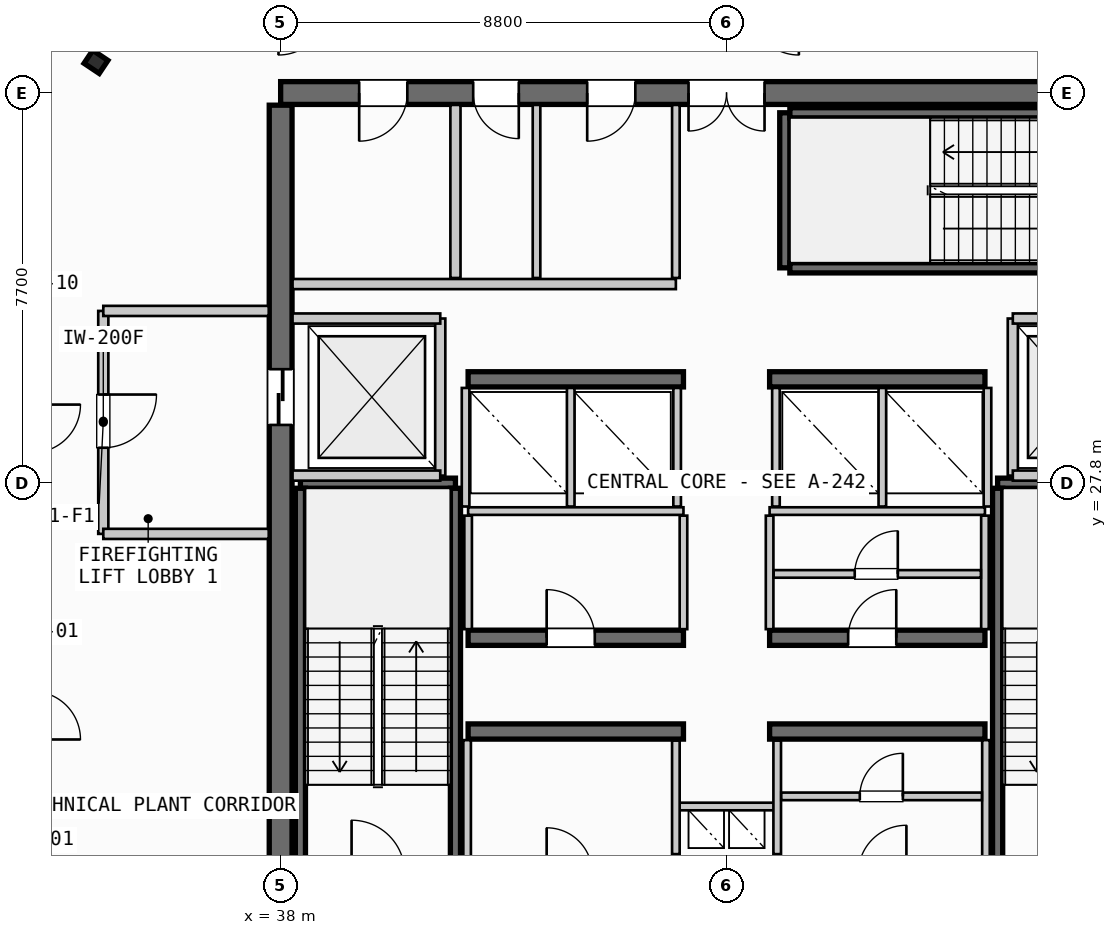
"""IFC4 building model, lengths in metres.
Left out: names, types, materials, properties, quantities, classifications, styles, units other than length and angle.
Written with IfcOpenShell. Run it as: python <this file> out.ifc"""

import sys

from ifc_helpers import new_model, si_unit, direction, frame, frame_2d, origin, origin_2d, place, context, subcontext, project, spatial, rectangle, i_section, extrude, source, transform, mapped, element, fill, save


model = new_model("IFC4")
c1 = context("Model", 3, precision=1e-05, world=origin(), true_north=direction((0.0, 1.0)))
c2 = subcontext(c1, "Body", "Model", "MODEL_VIEW")
j1 = project(units=[si_unit("LENGTHUNIT", "METRE"), si_unit("PLANEANGLEUNIT", "RADIAN")], contexts=[c1])
p1 = place(None, origin())
s1 = spatial("IfcSite", under=j1, at=p1, CompositionType="ELEMENT")
p2 = place(p1, origin())
s2 = spatial("IfcBuilding", under=s1, at=p2, CompositionType="ELEMENT")
p3 = place(p2, frame((0.0, 0.0, 304.3)))
s3 = spatial("IfcBuildingStorey", under=s2, at=p3, CompositionType="ELEMENT", Elevation=304.3)
p4 = place(p3, frame((55.6, 35.5, 0.0), z_axis=(0.0, 0.0, 1.0), x_axis=(-1.0, 0.0, 0.0)))
e1 = element("IfcWall", 1, at=p4, inside=s3, PredefinedType="SHEAR", context=c2, shape_type="SweptSolid", body=[
    extrude(rectangle(XDim=17.6, YDim=0.45, at=frame_2d((8.8, 0.0))), origin(), (0.0, 0.0, 1.0), 3.735),
])
p5 = place(p4, frame((8.05, 0.0, 0.0)))
e2 = element("IfcOpeningElement", 2, at=p5, cuts=e1, PredefinedType="OPENING", context=c2, shape_type="SweptSolid", body=[
    extrude(rectangle(XDim=1.5, YDim=2.2, at=frame_2d((0.75, 1.1))), frame((0.0, 0.235, 0.0), z_axis=(0.0, -1.0, 0.0), x_axis=(1.0, 0.0, 0.0)), (0.0, 0.0, 1.0), 0.47),
])
p6 = place(p4, frame((15.1, 0.0, 0.0)))
e3 = element("IfcOpeningElement", 3, at=p6, cuts=e1, PredefinedType="OPENING", context=c2, shape_type="SweptSolid", body=[
    extrude(rectangle(XDim=0.95, YDim=2.15, at=frame_2d((0.475, 1.075))), frame((0.0, 0.235, 0.0), z_axis=(0.0, -1.0, 0.0), x_axis=(1.0, 0.0, 0.0)), (0.0, 0.0, 1.0), 0.47),
])
p7 = place(p4, frame((12.9, 0.0, 0.0)))
e4 = element("IfcOpeningElement", 4, at=p7, cuts=e1, PredefinedType="OPENING", context=c2, shape_type="SweptSolid", body=[
    extrude(rectangle(XDim=0.9, YDim=2.15, at=frame_2d((0.45, 1.075))), frame((0.0, 0.235, 0.0), z_axis=(0.0, -1.0, 0.0), x_axis=(1.0, 0.0, 0.0)), (0.0, 0.0, 1.0), 0.47),
])
p8 = place(p4, frame((10.6, 0.0, 0.0)))
e5 = element("IfcOpeningElement", 5, at=p8, cuts=e1, PredefinedType="OPENING", context=c2, shape_type="SweptSolid", body=[
    extrude(rectangle(XDim=0.95, YDim=2.15, at=frame_2d((0.475, 1.075))), frame((0.0, 0.235, 0.0), z_axis=(0.0, -1.0, 0.0), x_axis=(1.0, 0.0, 0.0)), (0.0, 0.0, 1.0), 0.47),
])
p9 = place(p3, frame((38.0, 35.26, 0.0), z_axis=(0.0, 0.0, 1.0), x_axis=(0.0, -1.0, 0.0)))
e6 = element("IfcWall", 6, at=p9, inside=s3, PredefinedType="SHEAR", context=c2, shape_type="SweptSolid", body=[
    extrude(rectangle(XDim=14.92, YDim=0.45, at=frame_2d((7.46, 0.0))), origin(), (0.0, 0.0, 1.0), 3.735),
])
p10 = place(p9, frame((5.21, 0.0, 0.0)))
e7 = element("IfcOpeningElement", 7, at=p10, cuts=e6, PredefinedType="OPENING", context=c2, shape_type="SweptSolid", body=[
    extrude(rectangle(XDim=1.1, YDim=2.2, at=frame_2d((0.55, 1.1))), frame((0.0, 0.235, 0.0), z_axis=(0.0, -1.0, 0.0), x_axis=(1.0, 0.0, 0.0)), (0.0, 0.0, 1.0), 0.47),
])
for number, where, z_axis, x_axis in (
    (8, (41.7, 22.9, 0.0), (0.0, 0.0, 1.0), (1.0, 0.0, 0.0)),
    (9, (47.65, 22.9, 0.0), (0.0, 0.0, 1.0), (1.0, 0.0, 0.0)),
):
    element("IfcWall", number, at=place(p3, frame(where, z_axis=z_axis, x_axis=x_axis)), inside=s3, PredefinedType="SHEAR", context=c2, shape_type="SweptSolid", body=[
        extrude(rectangle(XDim=4.25, YDim=0.3, at=frame_2d((2.125, 0.0))), origin(), (0.0, 0.0, 1.0), 3.735),
    ])
p11 = place(p3, frame((41.7, 24.75, 0.0), z_axis=(0.0, 0.0, 1.0), x_axis=(1.0, 0.0, 0.0)))
e10 = element("IfcWall", 10, at=p11, inside=s3, PredefinedType="SHEAR", context=c2, shape_type="SweptSolid", body=[
    extrude(rectangle(XDim=4.25, YDim=0.3, at=frame_2d((2.125, 0.0))), origin(), (0.0, 0.0, 1.0), 3.735),
])
p12 = place(p11, frame((1.55, 0.0, 0.0)))
e11 = element("IfcOpeningElement", 11, at=p12, cuts=e10, PredefinedType="OPENING", context=c2, shape_type="SweptSolid", body=[
    extrude(rectangle(XDim=0.95, YDim=2.15, at=frame_2d((0.475, 1.075))), frame((0.0, 0.16, 0.0), z_axis=(0.0, -1.0, 0.0), x_axis=(1.0, 0.0, 0.0)), (0.0, 0.0, 1.0), 0.32),
])
p13 = place(p3, frame((47.65, 24.75, 0.0), z_axis=(0.0, 0.0, 1.0), x_axis=(1.0, 0.0, 0.0)))
e12 = element("IfcWall", 12, at=p13, inside=s3, PredefinedType="SHEAR", context=c2, shape_type="SweptSolid", body=[
    extrude(rectangle(XDim=4.25, YDim=0.3, at=frame_2d((2.125, 0.0))), origin(), (0.0, 0.0, 1.0), 3.735),
])
p14 = place(p13, frame((1.55, 0.0, 0.0)))
e13 = element("IfcOpeningElement", 13, at=p14, cuts=e12, PredefinedType="OPENING", context=c2, shape_type="SweptSolid", body=[
    extrude(rectangle(XDim=0.95, YDim=2.15, at=frame_2d((0.475, 1.075))), frame((0.0, 0.16, 0.0), z_axis=(0.0, -1.0, 0.0), x_axis=(1.0, 0.0, 0.0)), (0.0, 0.0, 1.0), 0.32),
])
for number, where, z_axis, x_axis in (
    (14, (41.7, 29.85, 0.0), (0.0, 0.0, 1.0), (1.0, 0.0, 0.0)),
    (15, (47.65, 29.85, 0.0), (0.0, 0.0, 1.0), (1.0, 0.0, 0.0)),
):
    element("IfcWall", number, at=place(p3, frame(where, z_axis=z_axis, x_axis=x_axis)), inside=s3, PredefinedType="SHEAR", context=c2, shape_type="SweptSolid", body=[
        extrude(rectangle(XDim=4.25, YDim=0.3, at=frame_2d((2.125, 0.0))), origin(), (0.0, 0.0, 1.0), 3.735),
    ])
m1 = source(origin(), c2, "Body", "SweptSolid", [
    extrude(i_section(OverallWidth=0.309, OverallDepth=0.359, WebThickness=0.016, FlangeThickness=0.026, FilletRadius=0.027, at=origin_2d()), origin(), (0.0, 0.0, 1.0), 3.735),
])
p15 = place(p3, frame((34.356, 36.115, 0.0), z_axis=(0.0, 0.0, 1.0), x_axis=(-0.831469612303, 0.55557023302, 0.0)))
e16 = element("IfcColumn", 16, at=p15, inside=s3, PredefinedType="COLUMN", context=c2, shape_type="MappedRepresentation", body=[
    mapped(m1, transform((0.0, 0.0, 0.0), scale=1.0)),
])
p16 = place(p3, frame((38.39, 27.8, 0.0), z_axis=(0.0, 0.0, 1.0), x_axis=(1.0, 0.0, 0.0)))
e17 = element("IfcWall", 17, at=p16, inside=s3, PredefinedType="SHEAR", context=c2, shape_type="SweptSolid", body=[
    extrude(rectangle(XDim=3.06, YDim=0.2, at=frame_2d((1.53, 0.0))), origin(), (0.0, 0.0, 1.0), 3.735),
])
for number, where, z_axis, x_axis in (
    (18, (41.45, 27.7, 0.0), (0.0, 0.0, 1.0), (0.0, -1.0, 0.0)),
    (19, (38.39, 20.35, 0.0), (0.0, 0.0, 1.0), (0.0, 1.0, 0.0)),
):
    element("IfcWall", number, at=place(p3, frame(where, z_axis=z_axis, x_axis=x_axis)), inside=s3, PredefinedType="SHEAR", context=c2, shape_type="SweptSolid", body=[
        extrude(rectangle(XDim=7.35, YDim=0.2, at=frame_2d((3.675, 0.0))), origin(), (0.0, 0.0, 1.0), 3.735),
    ])
p17 = place(p3, frame((52.15, 27.8, 0.0), z_axis=(0.0, 0.0, 1.0), x_axis=(1.0, 0.0, 0.0)))
e20 = element("IfcWall", 20, at=p17, inside=s3, PredefinedType="SHEAR", context=c2, shape_type="SweptSolid", body=[
    extrude(rectangle(XDim=3.06, YDim=0.2, at=frame_2d((1.53, 0.0))), origin(), (0.0, 0.0, 1.0), 3.735),
])
p18 = place(p3, frame((52.15, 20.35, 0.0), z_axis=(0.0, 0.0, 1.0), x_axis=(0.0, 1.0, 0.0)))
e21 = element("IfcWall", 21, at=p18, inside=s3, PredefinedType="SHEAR", context=c2, shape_type="SweptSolid", body=[
    extrude(rectangle(XDim=7.35, YDim=0.2, at=frame_2d((3.675, 0.0))), origin(), (0.0, 0.0, 1.0), 3.735),
])
p19 = place(p3, frame((47.95, 32.05, 0.0), z_axis=(0.0, 0.0, 1.0), x_axis=(0.0, 1.0, 0.0)))
e22 = element("IfcWall", 22, at=p19, inside=s3, PredefinedType="SHEAR", context=c2, shape_type="SweptSolid", body=[
    extrude(rectangle(XDim=3.06, YDim=0.2, at=frame_2d((1.53, 0.0))), origin(), (0.0, 0.0, 1.0), 3.735),
])
for number, where, z_axis, x_axis in (
    (23, (48.05, 35.11, 0.0), (0.0, 0.0, 1.0), (1.0, 0.0, 0.0)),
    (24, (55.4, 32.05, 0.0), (0.0, 0.0, 1.0), (-1.0, 0.0, 0.0)),
):
    element("IfcWall", number, at=place(p3, frame(where, z_axis=z_axis, x_axis=x_axis)), inside=s3, PredefinedType="SHEAR", context=c2, shape_type="SweptSolid", body=[
        extrude(rectangle(XDim=7.35, YDim=0.2, at=frame_2d((3.675, 0.0))), origin(), (0.0, 0.0, 1.0), 3.735),
    ])
p20 = place(p3, frame((45.8, 21.42, 0.0), z_axis=(0.0, 0.0, 1.0), x_axis=(1.0, 0.0, 0.0)))
e25 = element("IfcWall", 25, at=p20, inside=s3, PredefinedType="PARTITIONING", context=c2, shape_type="SweptSolid", body=[
    extrude(rectangle(XDim=2.0, YDim=0.15, at=frame_2d((1.0, 0.0))), origin(), (0.0, 0.0, 1.0), 3.26),
])
for number, where, z_axis, x_axis in (
    (26, (45.8, 20.48, 0.0), (0.0, 0.0, 1.0), (0.0, 1.0, 0.0)),
    (27, (47.8, 20.48, 0.0), (0.0, 0.0, 1.0), (0.0, 1.0, 0.0)),
):
    element("IfcWall", number, at=place(p3, frame(where, z_axis=z_axis, x_axis=x_axis)), inside=s3, PredefinedType="PARTITIONING", context=c2, shape_type="SweptSolid", body=[
        extrude(rectangle(XDim=2.24, YDim=0.15, at=frame_2d((1.12, 0.0))), origin(), (0.0, 0.0, 1.0), 3.26),
    ])
p21 = place(p3, frame((41.15, 27.95, 0.0), z_axis=(0.0, 0.0, 1.0), x_axis=(0.0, 1.0, 0.0)))
e28 = element("IfcWall", 28, at=p21, inside=s3, PredefinedType="PARTITIONING", context=c2, shape_type="SweptSolid", body=[
    extrude(rectangle(XDim=3.1, YDim=0.2, at=frame_2d((1.55, 0.0))), origin(), (0.0, 0.0, 1.0), 3.26),
])
for number, where, z_axis, x_axis in (
    (29, (38.235, 27.95, 0.0), (0.0, 0.0, 1.0), (1.0, 0.0, 0.0)),
    (30, (38.235, 31.05, 0.0), (0.0, 0.0, 1.0), (1.0, 0.0, 0.0)),
):
    element("IfcWall", number, at=place(p3, frame(where, z_axis=z_axis, x_axis=x_axis)), inside=s3, PredefinedType="PARTITIONING", context=c2, shape_type="SweptSolid", body=[
        extrude(rectangle(XDim=2.915, YDim=0.2, at=frame_2d((1.458, 0.0))), origin(), (0.0, 0.0, 1.0), 3.26),
    ])
p22 = place(p3, frame((34.5, 31.2, 0.0), z_axis=(0.0, 0.0, 1.0), x_axis=(0.0, -1.0, 0.0)))
e31 = element("IfcWall", 31, at=p22, inside=s3, PredefinedType="PARTITIONING", context=c2, shape_type="SweptSolid", body=[
    extrude(rectangle(XDim=4.4, YDim=0.2, at=frame_2d((2.2, 0.0))), origin(), (0.0, 0.0, 1.0), 3.26),
])
p23 = place(p22, frame((1.65, 0.0, 0.0)))
e32 = element("IfcOpeningElement", 32, at=p23, cuts=e31, PredefinedType="OPENING", context=c2, shape_type="SweptSolid", body=[
    extrude(rectangle(XDim=1.05, YDim=2.15, at=frame_2d((0.525, 1.075))), frame((0.0, 0.11, 0.0), z_axis=(0.0, -1.0, 0.0), x_axis=(1.0, 0.0, 0.0)), (0.0, 0.0, 1.0), 0.22),
])
for number, where, z_axis, x_axis in (
    (33, (34.5, 26.8, 0.0), (0.0, 0.0, 1.0), (1.0, 0.0, 0.0)),
    (34, (34.5, 31.2, 0.0), (0.0, 0.0, 1.0), (1.0, 0.0, 0.0)),
):
    element("IfcWall", number, at=place(p3, frame(where, z_axis=z_axis, x_axis=x_axis)), inside=s3, PredefinedType="PARTITIONING", context=c2, shape_type="SweptSolid", body=[
        extrude(rectangle(XDim=3.265, YDim=0.2, at=frame_2d((1.632, 0.0))), origin(), (0.0, 0.0, 1.0), 3.26),
    ])
p24 = place(p3, frame((52.45, 27.95, 0.0), z_axis=(0.0, 0.0, 1.0), x_axis=(0.0, 1.0, 0.0)))
e35 = element("IfcWall", 35, at=p24, inside=s3, PredefinedType="PARTITIONING", context=c2, shape_type="SweptSolid", body=[
    extrude(rectangle(XDim=3.1, YDim=0.2, at=frame_2d((1.55, 0.0))), origin(), (0.0, 0.0, 1.0), 3.26),
])
for number, where, z_axis, x_axis in (
    (36, (52.45, 27.95, 0.0), (0.0, 0.0, 1.0), (1.0, 0.0, 0.0)),
    (37, (52.45, 31.05, 0.0), (0.0, 0.0, 1.0), (1.0, 0.0, 0.0)),
):
    element("IfcWall", number, at=place(p3, frame(where, z_axis=z_axis, x_axis=x_axis)), inside=s3, PredefinedType="PARTITIONING", context=c2, shape_type="SweptSolid", body=[
        extrude(rectangle(XDim=2.915, YDim=0.2, at=frame_2d((1.458, 0.0))), origin(), (0.0, 0.0, 1.0), 3.26),
    ])
for number, where, z_axis, x_axis in (
    (38, (41.68, 20.335, 0.0), (0.0, 0.0, 1.0), (0.0, 1.0, 0.0)),
    (39, (51.92, 20.335, 0.0), (0.0, 0.0, 1.0), (0.0, 1.0, 0.0)),
):
    element("IfcWall", number, at=place(p3, frame(where, z_axis=z_axis, x_axis=x_axis)), inside=s3, PredefinedType="PARTITIONING", context=c2, shape_type="SweptSolid", body=[
        extrude(rectangle(XDim=2.395, YDim=0.15, at=frame_2d((1.198, 0.0))), origin(), (0.0, 0.0, 1.0), 3.26),
    ])
p25 = place(p3, frame((47.88, 21.62, 0.0), z_axis=(0.0, 0.0, 1.0), x_axis=(1.0, 0.0, 0.0)))
e40 = element("IfcWall", 40, at=p25, inside=s3, PredefinedType="PARTITIONING", context=c2, shape_type="SweptSolid", body=[
    extrude(rectangle(XDim=3.96, YDim=0.15, at=frame_2d((1.98, 0.0))), origin(), (0.0, 0.0, 1.0), 3.26),
])
p26 = place(p25, frame((1.55, 0.0, 0.0)))
e41 = element("IfcOpeningElement", 41, at=p26, cuts=e40, PredefinedType="OPENING", context=c2, shape_type="SweptSolid", body=[
    extrude(rectangle(XDim=0.85, YDim=2.15, at=frame_2d((0.425, 1.075))), frame((0.0, 0.085, 0.0), z_axis=(0.0, -1.0, 0.0), x_axis=(1.0, 0.0, 0.0)), (0.0, 0.0, 1.0), 0.17),
])
for number, where, z_axis, x_axis in (
    (42, (41.7, 27.25, 0.0), (0.0, 0.0, 1.0), (1.0, 0.0, 0.0)),
    (43, (47.65, 27.25, 0.0), (0.0, 0.0, 1.0), (1.0, 0.0, 0.0)),
):
    element("IfcWall", number, at=place(p3, frame(where, z_axis=z_axis, x_axis=x_axis)), inside=s3, PredefinedType="PARTITIONING", context=c2, shape_type="SweptSolid", body=[
        extrude(rectangle(XDim=4.25, YDim=0.15, at=frame_2d((2.125, 0.0))), origin(), (0.0, 0.0, 1.0), 3.26),
    ])
for number, where, z_axis, x_axis in (
    (44, (41.7, 24.92, 0.0), (0.0, 0.0, 1.0), (0.0, 1.0, 0.0)),
    (45, (45.95, 24.92, 0.0), (0.0, 0.0, 1.0), (0.0, 1.0, 0.0)),
    (46, (47.65, 24.92, 0.0), (0.0, 0.0, 1.0), (0.0, 1.0, 0.0)),
    (47, (51.9, 24.92, 0.0), (0.0, 0.0, 1.0), (0.0, 1.0, 0.0)),
):
    element("IfcWall", number, at=place(p3, frame(where, z_axis=z_axis, x_axis=x_axis)), inside=s3, PredefinedType="PARTITIONING", context=c2, shape_type="SweptSolid", body=[
        extrude(rectangle(XDim=2.24, YDim=0.15, at=frame_2d((1.12, 0.0))), origin(), (0.0, 0.0, 1.0), 3.26),
    ])
p27 = place(p3, frame((47.73, 26.01, 0.0), z_axis=(0.0, 0.0, 1.0), x_axis=(1.0, 0.0, 0.0)))
e48 = element("IfcWall", 48, at=p27, inside=s3, PredefinedType="PARTITIONING", context=c2, shape_type="SweptSolid", body=[
    extrude(rectangle(XDim=4.09, YDim=0.15, at=frame_2d((2.045, 0.0))), origin(), (0.0, 0.0, 1.0), 3.26),
])
p28 = place(p27, frame((1.6, 0.0, 0.0)))
e49 = element("IfcOpeningElement", 49, at=p28, cuts=e48, PredefinedType="OPENING", context=c2, shape_type="SweptSolid", body=[
    extrude(rectangle(XDim=0.85, YDim=2.15, at=frame_2d((0.425, 1.075))), frame((0.0, 0.085, 0.0), z_axis=(0.0, -1.0, 0.0), x_axis=(1.0, 0.0, 0.0)), (0.0, 0.0, 1.0), 0.17),
])
for number, where, z_axis, x_axis in (
    (50, (41.65, 27.34, 0.0), (0.0, 0.0, 1.0), (0.0, 1.0, 0.0)),
    (51, (43.725, 27.34, 0.0), (0.0, 0.0, 1.0), (0.0, 1.0, 0.0)),
    (52, (45.825, 27.34, 0.0), (0.0, 0.0, 1.0), (0.0, 1.0, 0.0)),
    (53, (47.775, 27.34, 0.0), (0.0, 0.0, 1.0), (0.0, 1.0, 0.0)),
    (54, (49.875, 27.34, 0.0), (0.0, 0.0, 1.0), (0.0, 1.0, 0.0)),
    (55, (51.95, 27.34, 0.0), (0.0, 0.0, 1.0), (0.0, 1.0, 0.0)),
):
    element("IfcWall", number, at=place(p3, frame(where, z_axis=z_axis, x_axis=x_axis)), inside=s3, PredefinedType="PARTITIONING", context=c2, shape_type="SweptSolid", body=[
        extrude(rectangle(XDim=2.34, YDim=0.15, at=frame_2d((1.17, 0.0))), origin(), (0.0, 0.0, 1.0), 3.26),
    ])
p29 = place(p3, frame((41.45, 31.85, 0.0), z_axis=(0.0, 0.0, 1.0), x_axis=(0.0, 1.0, 0.0)))
e56 = element("IfcWall", 56, at=p29, inside=s3, PredefinedType="PARTITIONING", context=c2, shape_type="SweptSolid", body=[
    extrude(rectangle(XDim=3.415, YDim=0.2, at=frame_2d((1.708, 0.0))), origin(), (0.0, 0.0, 1.0), 3.26),
])
p30 = place(p3, frame((38.235, 31.73, 0.0), z_axis=(0.0, 0.0, 1.0), x_axis=(1.0, 0.0, 0.0)))
e57 = element("IfcWall", 57, at=p30, inside=s3, PredefinedType="PARTITIONING", context=c2, shape_type="SweptSolid", body=[
    extrude(rectangle(XDim=7.565, YDim=0.2, at=frame_2d((3.782, 0.0))), origin(), (0.0, 0.0, 1.0), 3.26),
])
p31 = place(p3, frame((45.8, 31.85, 0.0), z_axis=(0.0, 0.0, 1.0), x_axis=(0.0, 1.0, 0.0)))
e58 = element("IfcWall", 58, at=p31, inside=s3, PredefinedType="PARTITIONING", context=c2, shape_type="SweptSolid", body=[
    extrude(rectangle(XDim=3.415, YDim=0.15, at=frame_2d((1.708, 0.0))), origin(), (0.0, 0.0, 1.0), 3.26),
])
p32 = place(p3, frame((43.05, 31.85, 0.0), z_axis=(0.0, 0.0, 1.0), x_axis=(0.0, 1.0, 0.0)))
e59 = element("IfcWall", 59, at=p32, inside=s3, PredefinedType="PLUMBINGWALL", context=c2, shape_type="SweptSolid", body=[
    extrude(rectangle(XDim=3.415, YDim=0.15, at=frame_2d((1.708, 0.0))), origin(), (0.0, 0.0, 1.0), 3.26),
])
m2 = source(origin(), c2, "Body", "SweptSolid", [
    extrude(rectangle(XDim=1.5, YDim=2.2, at=frame_2d((0.75, 1.1))), frame((0.0, 0.025, 0.0), z_axis=(0.0, -1.0, 0.0), x_axis=(1.0, 0.0, 0.0)), (0.0, 0.0, 1.0), 0.05),
])
p33 = place(p5, origin())
e60 = element("IfcDoor", 60, at=p33, inside=s3, OperationType="DOUBLE_DOOR_SINGLE_SWING", PredefinedType="DOOR", context=c2, shape_type="MappedRepresentation", body=[
    mapped(m2, transform((0.0, 0.0, 0.0), scale=1.0)),
])
fill(e2, e60)
m3 = source(origin(), c2, "Body", "SweptSolid", [
    extrude(rectangle(XDim=1.1, YDim=2.2, at=frame_2d((0.55, 1.1))), frame((0.0, 0.025, 0.0), z_axis=(0.0, -1.0, 0.0), x_axis=(1.0, 0.0, 0.0)), (0.0, 0.0, 1.0), 0.05),
])
p34 = place(p10, origin())
e61 = element("IfcDoor", 61, at=p34, inside=s3, OperationType="SLIDING_TO_LEFT", PredefinedType="DOOR", context=c2, shape_type="MappedRepresentation", body=[
    mapped(m3, transform((0.0, 0.0, 0.0), scale=1.0)),
])
fill(e7, e61)
m4 = source(origin(), c2, "Body", "SweptSolid", [
    extrude(rectangle(XDim=0.95, YDim=2.15, at=frame_2d((0.475, 1.075))), frame((0.0, 0.025, 0.0), z_axis=(0.0, -1.0, 0.0), x_axis=(1.0, 0.0, 0.0)), (0.0, 0.0, 1.0), 0.05),
])
p35 = place(p12, origin())
e62 = element("IfcDoor", 62, at=p35, inside=s3, OperationType="SINGLE_SWING_LEFT", PredefinedType="DOOR", context=c2, shape_type="MappedRepresentation", body=[
    mapped(m4, transform((0.0, 0.0, 0.0), scale=1.0)),
])
fill(e11, e62)
p36 = place(p14, origin())
e63 = element("IfcDoor", 63, at=p36, inside=s3, OperationType="SINGLE_SWING_RIGHT", PredefinedType="DOOR", context=c2, shape_type="MappedRepresentation", body=[
    mapped(m4, transform((0.0, 0.0, 0.0), scale=1.0)),
])
fill(e13, e63)
p37 = place(p6, origin())
e64 = element("IfcDoor", 64, at=p37, inside=s3, OperationType="SINGLE_SWING_RIGHT", PredefinedType="DOOR", context=c2, shape_type="MappedRepresentation", body=[
    mapped(m4, transform((0.0, 0.0, 0.0), scale=1.0)),
])
fill(e3, e64)
m5 = source(origin(), c2, "Body", "SweptSolid", [
    extrude(rectangle(XDim=0.9, YDim=2.15, at=frame_2d((0.45, 1.075))), frame((0.0, 0.025, 0.0), z_axis=(0.0, -1.0, 0.0), x_axis=(1.0, 0.0, 0.0)), (0.0, 0.0, 1.0), 0.05),
])
p38 = place(p7, origin())
e65 = element("IfcDoor", 65, at=p38, inside=s3, OperationType="SINGLE_SWING_LEFT", PredefinedType="DOOR", context=c2, shape_type="MappedRepresentation", body=[
    mapped(m5, transform((0.0, 0.0, 0.0), scale=1.0)),
])
fill(e4, e65)
p39 = place(p8, origin())
e66 = element("IfcDoor", 66, at=p39, inside=s3, OperationType="SINGLE_SWING_RIGHT", PredefinedType="DOOR", context=c2, shape_type="MappedRepresentation", body=[
    mapped(m4, transform((0.0, 0.0, 0.0), scale=1.0)),
])
fill(e5, e66)
m6 = source(origin(), c2, "Body", "SweptSolid", [
    extrude(rectangle(XDim=1.05, YDim=2.15, at=frame_2d((0.525, 1.075))), frame((0.0, 0.025, 0.0), z_axis=(0.0, -1.0, 0.0), x_axis=(1.0, 0.0, 0.0)), (0.0, 0.0, 1.0), 0.05),
])
p40 = place(p23, origin())
e67 = element("IfcDoor", 67, at=p40, inside=s3, OperationType="SINGLE_SWING_LEFT", PredefinedType="DOOR", context=c2, shape_type="MappedRepresentation", body=[
    mapped(m6, transform((0.0, 0.0, 0.0), scale=1.0)),
])
fill(e32, e67)
m7 = source(origin(), c2, "Body", "SweptSolid", [
    extrude(rectangle(XDim=0.85, YDim=2.15, at=frame_2d((0.425, 1.075))), frame((0.0, 0.025, 0.0), z_axis=(0.0, -1.0, 0.0), x_axis=(1.0, 0.0, 0.0)), (0.0, 0.0, 1.0), 0.05),
])
p41 = place(p26, origin())
e68 = element("IfcDoor", 68, at=p41, inside=s3, OperationType="SINGLE_SWING_RIGHT", PredefinedType="DOOR", context=c2, shape_type="MappedRepresentation", body=[
    mapped(m7, transform((0.0, 0.0, 0.0), scale=1.0)),
])
fill(e41, e68)
p42 = place(p28, origin())
e69 = element("IfcDoor", 69, at=p42, inside=s3, OperationType="SINGLE_SWING_RIGHT", PredefinedType="DOOR", context=c2, shape_type="MappedRepresentation", body=[
    mapped(m7, transform((0.0, 0.0, 0.0), scale=1.0)),
])
fill(e49, e69)
save(model, sys.argv[1])
